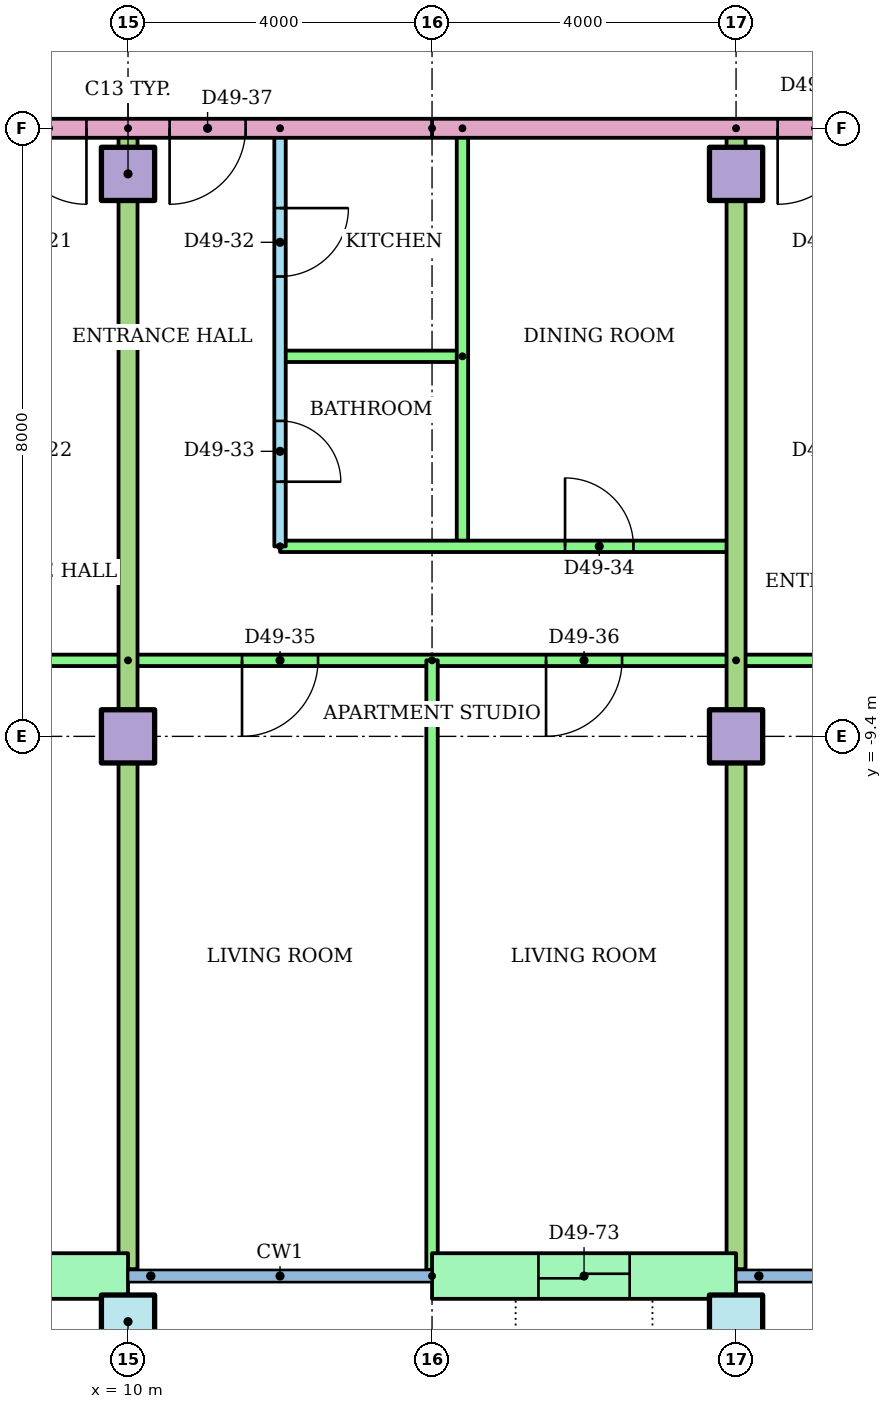
"""IFC4 building model, lengths in metres.
Left out: names, types, materials, properties, quantities, classifications, styles, units other than length and angle.
Written with IfcOpenShell. Run it as: python <this file> out.ifc"""

import sys

from ifc_helpers import new_model, si_unit, direction, frame, frame_2d, origin, origin_2d, place, context, subcontext, project, spatial, rectangle, hollow_rectangle, extrude, element, fill, save


model = new_model("IFC4")
c1 = context("Model", 3, precision=1e-05, world=origin(), true_north=direction((0.0, 1.0)))
c2 = subcontext(c1, "Body", "Model", "MODEL_VIEW")
j1 = project(units=[si_unit("LENGTHUNIT", "METRE"), si_unit("PLANEANGLEUNIT", "RADIAN")], contexts=[c1])
p1 = place(None, origin())
s1 = spatial("IfcSite", under=j1, at=p1, CompositionType="ELEMENT")
p2 = place(p1, origin())
s2 = spatial("IfcBuilding", under=s1, at=p2, CompositionType="ELEMENT")
p3 = place(p2, frame((0.0, 0.0, 187.7)))
s3 = spatial("IfcBuildingStorey", under=s2, at=p3, CompositionType="ELEMENT", Elevation=187.7)
for number, where in (
    (1, (10.0, -17.1, 0.0)),
    (2, (18.0, -17.1, 0.0)),
):
    element("IfcColumn", number, at=place(p3, frame(where)), inside=s3, PredefinedType="COLUMN", context=c2, shape_type="SweptSolid", body=[
        extrude(hollow_rectangle(XDim=0.7, YDim=0.7, WallThickness=0.036, at=origin_2d()), origin(), (0.0, 0.0, 1.0), 3.2),
    ])
for number, where in (
    (3, (10.0, -9.4, 0.0)),
    (4, (18.0, -9.4, 0.0)),
    (5, (10.0, -2.0, 0.0)),
    (6, (18.0, -2.0, 0.0)),
):
    element("IfcColumn", number, at=place(p3, frame(where)), inside=s3, PredefinedType="COLUMN", context=c2, shape_type="SweptSolid", body=[
        extrude(rectangle(XDim=0.7, YDim=0.7, at=origin_2d()), origin(), (0.0, 0.0, 1.0), 3.2),
    ])
p4 = place(p3, frame((6.0, -16.5, 0.0)))
e7 = element("IfcWall", 7, at=p4, inside=s3, PredefinedType="STANDARD", context=c2, shape_type="SweptSolid", body=[
    extrude(rectangle(XDim=4.0, YDim=0.6, at=frame_2d((2.0, 0.0))), origin(), (0.0, 0.0, 1.0), 2.92),
])
p5 = place(p4, frame((1.4, 0.0, 0.0)))
e8 = element("IfcOpeningElement", 8, at=p5, cuts=e7, PredefinedType="OPENING", context=c2, shape_type="SweptSolid", body=[
    extrude(rectangle(XDim=1.2, YDim=2.1, at=frame_2d((0.6, 1.05))), frame((0.0, 0.31, 0.0), z_axis=(0.0, -1.0, 0.0), x_axis=(1.0, 0.0, 0.0)), (0.0, 0.0, 1.0), 0.62),
])
p6 = place(p3, frame((14.0, -16.5, 0.0)))
e9 = element("IfcWall", 9, at=p6, inside=s3, PredefinedType="STANDARD", context=c2, shape_type="SweptSolid", body=[
    extrude(rectangle(XDim=4.0, YDim=0.6, at=frame_2d((2.0, 0.0))), origin(), (0.0, 0.0, 1.0), 2.92),
])
p7 = place(p6, frame((1.4, 0.0, 0.0)))
e10 = element("IfcOpeningElement", 10, at=p7, cuts=e9, PredefinedType="OPENING", context=c2, shape_type="SweptSolid", body=[
    extrude(rectangle(XDim=1.2, YDim=2.1, at=frame_2d((0.6, 1.05))), frame((0.0, 0.31, 0.0), z_axis=(0.0, -1.0, 0.0), x_axis=(1.0, 0.0, 0.0)), (0.0, 0.0, 1.0), 0.62),
])
p8 = place(p3, frame((10.0, -8.4, 0.0), z_axis=(0.0, 0.0, 1.0), x_axis=(-1.0, 0.0, 0.0)))
e11 = element("IfcWall", 11, at=p8, inside=s3, PredefinedType="PARTITIONING", context=c2, shape_type="SweptSolid", body=[
    extrude(rectangle(XDim=24.0, YDim=0.15, at=frame_2d((12.0, 0.0))), origin(), (0.0, 0.0, 1.0), 2.4),
])
p9 = place(p8, frame((19.5, 0.0, 0.0)))
e12 = element("IfcOpeningElement", 12, at=p9, cuts=e11, PredefinedType="OPENING", context=c2, shape_type="SweptSolid", body=[
    extrude(rectangle(XDim=1.0, YDim=2.1, at=frame_2d((0.5, 1.05))), frame((0.0, 0.085, 0.0), z_axis=(0.0, -1.0, 0.0), x_axis=(1.0, 0.0, 0.0)), (0.0, 0.0, 1.0), 0.17),
])
p10 = place(p8, frame((13.55, 0.0, 0.0)))
e13 = element("IfcOpeningElement", 13, at=p10, cuts=e11, PredefinedType="OPENING", context=c2, shape_type="SweptSolid", body=[
    extrude(rectangle(XDim=0.9, YDim=2.1, at=frame_2d((0.45, 1.05))), frame((0.0, 0.085, 0.0), z_axis=(0.0, -1.0, 0.0), x_axis=(1.0, 0.0, 0.0)), (0.0, 0.0, 1.0), 0.17),
])
p11 = place(p8, frame((9.55, 0.0, 0.0)))
e14 = element("IfcOpeningElement", 14, at=p11, cuts=e11, PredefinedType="OPENING", context=c2, shape_type="SweptSolid", body=[
    extrude(rectangle(XDim=0.9, YDim=2.1, at=frame_2d((0.45, 1.05))), frame((0.0, 0.085, 0.0), z_axis=(0.0, -1.0, 0.0), x_axis=(1.0, 0.0, 0.0)), (0.0, 0.0, 1.0), 0.17),
])
p12 = place(p8, frame((5.55, 0.0, 0.0)))
e15 = element("IfcOpeningElement", 15, at=p12, cuts=e11, PredefinedType="OPENING", context=c2, shape_type="SweptSolid", body=[
    extrude(rectangle(XDim=0.9, YDim=2.1, at=frame_2d((0.45, 1.05))), frame((0.0, 0.085, 0.0), z_axis=(0.0, -1.0, 0.0), x_axis=(1.0, 0.0, 0.0)), (0.0, 0.0, 1.0), 0.17),
])
p13 = place(p8, frame((1.55, 0.0, 0.0)))
e16 = element("IfcOpeningElement", 16, at=p13, cuts=e11, PredefinedType="OPENING", context=c2, shape_type="SweptSolid", body=[
    extrude(rectangle(XDim=0.9, YDim=2.1, at=frame_2d((0.45, 1.05))), frame((0.0, 0.085, 0.0), z_axis=(0.0, -1.0, 0.0), x_axis=(1.0, 0.0, 0.0)), (0.0, 0.0, 1.0), 0.17),
])
p14 = place(p3, frame((12.0, -1.4, 0.0), z_axis=(0.0, 0.0, 1.0), x_axis=(0.0, -1.0, 0.0)))
e17 = element("IfcWall", 17, at=p14, inside=s3, PredefinedType="PARTITIONING", context=c2, shape_type="SweptSolid", body=[
    extrude(rectangle(XDim=5.5, YDim=0.15, at=frame_2d((2.75, 0.0))), origin(), (0.0, 0.0, 1.0), 2.4),
])
p15 = place(p14, frame((1.05, 0.0, 0.0)))
e18 = element("IfcOpeningElement", 18, at=p15, cuts=e17, PredefinedType="OPENING", context=c2, shape_type="SweptSolid", body=[
    extrude(rectangle(XDim=0.9, YDim=2.1, at=frame_2d((0.45, 1.05))), frame((0.0, 0.085, 0.0), z_axis=(0.0, -1.0, 0.0), x_axis=(1.0, 0.0, 0.0)), (0.0, 0.0, 1.0), 0.17),
])
p16 = place(p14, frame((3.85, 0.0, 0.0)))
e19 = element("IfcOpeningElement", 19, at=p16, cuts=e17, PredefinedType="OPENING", context=c2, shape_type="SweptSolid", body=[
    extrude(rectangle(XDim=0.8, YDim=2.1, at=frame_2d((0.4, 1.05))), frame((0.0, 0.085, 0.0), z_axis=(0.0, -1.0, 0.0), x_axis=(1.0, 0.0, 0.0)), (0.0, 0.0, 1.0), 0.17),
])
p17 = place(p3, frame((14.4, -4.4, 0.0), z_axis=(0.0, 0.0, 1.0), x_axis=(-1.0, 0.0, 0.0)))
e20 = element("IfcWall", 20, at=p17, inside=s3, PredefinedType="PARTITIONING", context=c2, shape_type="SweptSolid", body=[
    extrude(rectangle(XDim=2.4, YDim=0.15, at=frame_2d((1.2, 0.0))), origin(), (0.0, 0.0, 1.0), 2.4),
])
p18 = place(p3, frame((14.4, -1.4, 0.0), z_axis=(0.0, 0.0, 1.0), x_axis=(0.0, -1.0, 0.0)))
e21 = element("IfcWall", 21, at=p18, inside=s3, PredefinedType="PARTITIONING", context=c2, shape_type="SweptSolid", body=[
    extrude(rectangle(XDim=5.5, YDim=0.15, at=frame_2d((2.75, 0.0))), origin(), (0.0, 0.0, 1.0), 2.4),
])
p19 = place(p3, frame((12.0, -6.9, 0.0)))
e22 = element("IfcWall", 22, at=p19, inside=s3, PredefinedType="PARTITIONING", context=c2, shape_type="SweptSolid", body=[
    extrude(rectangle(XDim=6.0, YDim=0.15, at=frame_2d((3.0, 0.0))), origin(), (0.0, 0.0, 1.0), 2.4),
])
p20 = place(p19, frame((3.75, 0.0, 0.0)))
e23 = element("IfcOpeningElement", 23, at=p20, cuts=e22, PredefinedType="OPENING", context=c2, shape_type="SweptSolid", body=[
    extrude(rectangle(XDim=0.9, YDim=2.1, at=frame_2d((0.45, 1.05))), frame((0.0, 0.085, 0.0), z_axis=(0.0, -1.0, 0.0), x_axis=(1.0, 0.0, 0.0)), (0.0, 0.0, 1.0), 0.17),
])
p21 = place(p3, frame((18.0, -8.4, 0.0), z_axis=(0.0, 0.0, 1.0), x_axis=(-1.0, 0.0, 0.0)))
e24 = element("IfcWall", 24, at=p21, inside=s3, PredefinedType="PARTITIONING", context=c2, shape_type="SweptSolid", body=[
    extrude(rectangle(XDim=8.0, YDim=0.15, at=frame_2d((4.0, 0.0))), origin(), (0.0, 0.0, 1.0), 2.4),
])
p22 = place(p21, frame((5.5, 0.0, 0.0)))
e25 = element("IfcOpeningElement", 25, at=p22, cuts=e24, PredefinedType="OPENING", context=c2, shape_type="SweptSolid", body=[
    extrude(rectangle(XDim=1.0, YDim=2.1, at=frame_2d((0.5, 1.05))), frame((0.0, 0.085, 0.0), z_axis=(0.0, -1.0, 0.0), x_axis=(1.0, 0.0, 0.0)), (0.0, 0.0, 1.0), 0.17),
])
p23 = place(p21, frame((1.5, 0.0, 0.0)))
e26 = element("IfcOpeningElement", 26, at=p23, cuts=e24, PredefinedType="OPENING", context=c2, shape_type="SweptSolid", body=[
    extrude(rectangle(XDim=1.0, YDim=2.1, at=frame_2d((0.5, 1.05))), frame((0.0, 0.085, 0.0), z_axis=(0.0, -1.0, 0.0), x_axis=(1.0, 0.0, 0.0)), (0.0, 0.0, 1.0), 0.17),
])
p24 = place(p3, frame((14.0, -8.4, 0.0), z_axis=(0.0, 0.0, 1.0), x_axis=(0.0, -1.0, 0.0)))
e27 = element("IfcWall", 27, at=p24, inside=s3, PredefinedType="PARTITIONING", context=c2, shape_type="SweptSolid", body=[
    extrude(rectangle(XDim=8.021, YDim=0.15, at=frame_2d((4.01, 0.0))), origin(), (0.0, 0.0, 1.0), 2.4),
])
p25 = place(p3, frame((10.0, -1.4, 0.0), z_axis=(0.0, 0.0, 1.0), x_axis=(0.0, -1.0, 0.0)))
e28 = element("IfcWall", 28, at=p25, inside=s3, PredefinedType="PARTITIONING", context=c2, shape_type="SweptSolid", body=[
    extrude(rectangle(XDim=15.01, YDim=0.25, at=frame_2d((7.505, 0.0))), origin(), (0.0, 0.0, 1.0), 2.4),
])
p26 = place(p3, frame((36.82, -8.4, 0.0), z_axis=(0.0, 0.0, 1.0), x_axis=(-1.0, 0.0, 0.0)))
e29 = element("IfcWall", 29, at=p26, inside=s3, PredefinedType="PARTITIONING", context=c2, shape_type="SweptSolid", body=[
    extrude(rectangle(XDim=18.82, YDim=0.15, at=frame_2d((9.41, 0.0))), origin(), (0.0, 0.0, 1.0), 2.4),
])
p27 = place(p26, frame((14.32, 0.0, 0.0)))
e30 = element("IfcOpeningElement", 30, at=p27, cuts=e29, PredefinedType="OPENING", context=c2, shape_type="SweptSolid", body=[
    extrude(rectangle(XDim=1.0, YDim=2.1, at=frame_2d((0.5, 1.05))), frame((0.0, 0.085, 0.0), z_axis=(0.0, -1.0, 0.0), x_axis=(1.0, 0.0, 0.0)), (0.0, 0.0, 1.0), 0.17),
])
p28 = place(p26, frame((7.32, 0.0, 0.0)))
e31 = element("IfcOpeningElement", 31, at=p28, cuts=e29, PredefinedType="OPENING", context=c2, shape_type="SweptSolid", body=[
    extrude(rectangle(XDim=0.9, YDim=2.1, at=frame_2d((0.45, 1.05))), frame((0.0, 0.085, 0.0), z_axis=(0.0, -1.0, 0.0), x_axis=(1.0, 0.0, 0.0)), (0.0, 0.0, 1.0), 0.17),
])
p29 = place(p26, frame((1.373, 0.0, 0.0)))
e32 = element("IfcOpeningElement", 32, at=p29, cuts=e29, PredefinedType="OPENING", context=c2, shape_type="SweptSolid", body=[
    extrude(rectangle(XDim=0.9, YDim=2.1, at=frame_2d((0.45, 1.05))), frame((0.0, 0.085, 0.0), z_axis=(0.0, -1.0, 0.0), x_axis=(1.0, 0.0, 0.0)), (0.0, 0.0, 1.0), 0.17),
])
p30 = place(p3, frame((18.0, -1.4, 0.0), z_axis=(0.0, 0.0, 1.0), x_axis=(0.0, -1.0, 0.0)))
e33 = element("IfcWall", 33, at=p30, inside=s3, PredefinedType="PARTITIONING", context=c2, shape_type="SweptSolid", body=[
    extrude(rectangle(XDim=15.01, YDim=0.25, at=frame_2d((7.505, 0.0))), origin(), (0.0, 0.0, 1.0), 2.4),
])
p31 = place(p3, frame((29.0, -1.4, 0.0), z_axis=(0.0, 0.0, 1.0), x_axis=(-1.0, 0.0, 0.0)))
e34 = element("IfcWall", 34, at=p31, inside=s3, PredefinedType="PARTITIONING", context=c2, shape_type="SweptSolid", body=[
    extrude(rectangle(XDim=15.0, YDim=0.25, at=frame_2d((7.5, 0.0))), origin(), (0.0, 0.0, 1.0), 2.4),
])
p32 = place(p31, frame((9.453, 0.0, 0.0)))
e35 = element("IfcOpeningElement", 35, at=p32, cuts=e34, PredefinedType="OPENING", context=c2, shape_type="SweptSolid", body=[
    extrude(rectangle(XDim=1.0, YDim=2.1, at=frame_2d((0.5, 1.05))), frame((0.0, 0.135, 0.0), z_axis=(0.0, -1.0, 0.0), x_axis=(1.0, 0.0, 0.0)), (0.0, 0.0, 1.0), 0.27),
])
p33 = place(p3, frame((14.0, -1.4, 0.0), z_axis=(0.0, 0.0, 1.0), x_axis=(-1.0, 0.0, 0.0)))
e36 = element("IfcWall", 36, at=p33, inside=s3, PredefinedType="PARTITIONING", context=c2, shape_type="SweptSolid", body=[
    extrude(rectangle(XDim=28.0, YDim=0.25, at=frame_2d((14.0, 0.0))), origin(), (0.0, 0.0, 1.0), 2.4),
])
p34 = place(p33, frame((4.547, 0.0, 0.0)))
e37 = element("IfcOpeningElement", 37, at=p34, cuts=e36, PredefinedType="OPENING", context=c2, shape_type="SweptSolid", body=[
    extrude(rectangle(XDim=1.0, YDim=2.1, at=frame_2d((0.5, 1.05))), frame((0.0, 0.135, 0.0), z_axis=(0.0, -1.0, 0.0), x_axis=(1.0, 0.0, 0.0)), (0.0, 0.0, 1.0), 0.27),
])
p35 = place(p33, frame((2.453, 0.0, 0.0)))
e38 = element("IfcOpeningElement", 38, at=p35, cuts=e36, PredefinedType="OPENING", context=c2, shape_type="SweptSolid", body=[
    extrude(rectangle(XDim=1.0, YDim=2.1, at=frame_2d((0.5, 1.05))), frame((0.0, 0.135, 0.0), z_axis=(0.0, -1.0, 0.0), x_axis=(1.0, 0.0, 0.0)), (0.0, 0.0, 1.0), 0.27),
])
p36 = place(p34, origin())
e39 = element("IfcDoor", 39, at=p36, inside=s3, OperationType="SINGLE_SWING_LEFT", PredefinedType="DOOR", context=c2, shape_type="SweptSolid", body=[
    extrude(rectangle(XDim=1.0, YDim=2.1, at=frame_2d((0.5, 1.05))), frame((0.0, 0.025, 0.0), z_axis=(0.0, -1.0, 0.0), x_axis=(1.0, 0.0, 0.0)), (0.0, 0.0, 1.0), 0.05),
])
fill(e37, e39)
p37 = place(p15, origin())
e40 = element("IfcDoor", 40, at=p37, inside=s3, OperationType="SINGLE_SWING_LEFT", PredefinedType="DOOR", context=c2, shape_type="SweptSolid", body=[
    extrude(rectangle(XDim=0.9, YDim=2.1, at=frame_2d((0.45, 1.05))), frame((0.0, 0.025, 0.0), z_axis=(0.0, -1.0, 0.0), x_axis=(1.0, 0.0, 0.0)), (0.0, 0.0, 1.0), 0.05),
])
fill(e18, e40)
p38 = place(p16, origin())
e41 = element("IfcDoor", 41, at=p38, inside=s3, OperationType="SINGLE_SWING_RIGHT", PredefinedType="DOOR", context=c2, shape_type="SweptSolid", body=[
    extrude(rectangle(XDim=0.8, YDim=2.1, at=frame_2d((0.4, 1.05))), frame((0.0, 0.025, 0.0), z_axis=(0.0, -1.0, 0.0), x_axis=(1.0, 0.0, 0.0)), (0.0, 0.0, 1.0), 0.05),
])
fill(e19, e41)
p39 = place(p20, origin())
e42 = element("IfcDoor", 42, at=p39, inside=s3, OperationType="SINGLE_SWING_LEFT", PredefinedType="DOOR", context=c2, shape_type="SweptSolid", body=[
    extrude(rectangle(XDim=0.9, YDim=2.1, at=frame_2d((0.45, 1.05))), frame((0.0, 0.025, 0.0), z_axis=(0.0, -1.0, 0.0), x_axis=(1.0, 0.0, 0.0)), (0.0, 0.0, 1.0), 0.05),
])
fill(e23, e42)
p40 = place(p22, origin())
e43 = element("IfcDoor", 43, at=p40, inside=s3, OperationType="SINGLE_SWING_RIGHT", PredefinedType="DOOR", context=c2, shape_type="SweptSolid", body=[
    extrude(rectangle(XDim=1.0, YDim=2.1, at=frame_2d((0.5, 1.05))), frame((0.0, 0.025, 0.0), z_axis=(0.0, -1.0, 0.0), x_axis=(1.0, 0.0, 0.0)), (0.0, 0.0, 1.0), 0.05),
])
fill(e25, e43)
p41 = place(p23, origin())
e44 = element("IfcDoor", 44, at=p41, inside=s3, OperationType="SINGLE_SWING_RIGHT", PredefinedType="DOOR", context=c2, shape_type="SweptSolid", body=[
    extrude(rectangle(XDim=1.0, YDim=2.1, at=frame_2d((0.5, 1.05))), frame((0.0, 0.025, 0.0), z_axis=(0.0, -1.0, 0.0), x_axis=(1.0, 0.0, 0.0)), (0.0, 0.0, 1.0), 0.05),
])
fill(e26, e44)
p42 = place(p35, origin())
e45 = element("IfcDoor", 45, at=p42, inside=s3, OperationType="SINGLE_SWING_RIGHT", PredefinedType="DOOR", context=c2, shape_type="SweptSolid", body=[
    extrude(rectangle(XDim=1.0, YDim=2.1, at=frame_2d((0.5, 1.05))), frame((0.0, 0.025, 0.0), z_axis=(0.0, -1.0, 0.0), x_axis=(1.0, 0.0, 0.0)), (0.0, 0.0, 1.0), 0.05),
])
fill(e38, e45)
p43 = place(p32, origin())
e46 = element("IfcDoor", 46, at=p43, inside=s3, OperationType="SINGLE_SWING_RIGHT", PredefinedType="DOOR", context=c2, shape_type="SweptSolid", body=[
    extrude(rectangle(XDim=1.0, YDim=2.1, at=frame_2d((0.5, 1.05))), frame((0.0, 0.025, 0.0), z_axis=(0.0, -1.0, 0.0), x_axis=(1.0, 0.0, 0.0)), (0.0, 0.0, 1.0), 0.05),
])
fill(e35, e46)
p44 = place(p7, origin())
e47 = element("IfcDoor", 47, at=p44, inside=s3, OperationType="SLIDING_TO_LEFT", PredefinedType="DOOR", context=c2, shape_type="SweptSolid", body=[
    extrude(rectangle(XDim=1.2, YDim=2.1, at=frame_2d((0.6, 1.05))), frame((0.0, 0.025, 0.0), z_axis=(0.0, -1.0, 0.0), x_axis=(1.0, 0.0, 0.0)), (0.0, 0.0, 1.0), 0.05),
])
fill(e10, e47)
save(model, sys.argv[1])
